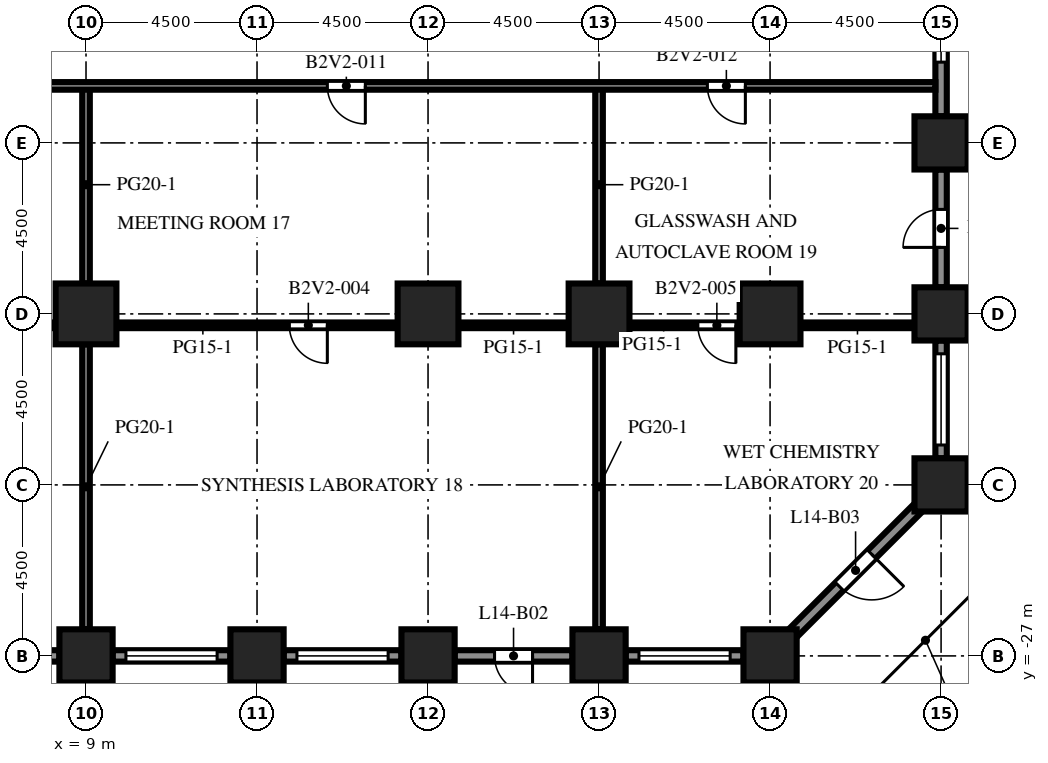
"""IFC4 building model, lengths in metres.
Left out: names, types, materials, properties, quantities, classifications, styles, units other than length and angle.
Written with IfcOpenShell. Run it as: python <this file> out.ifc"""

import sys

from ifc_helpers import new_model, si_unit, direction, frame, frame_2d, origin, origin_2d, place, context, subcontext, project, spatial, rectangle, extrude, element, fill, save


model = new_model("IFC4")
c1 = context("Model", 3, precision=1e-05, world=origin(), true_north=direction((0.0, 1.0)))
c2 = subcontext(c1, "Body", "Model", "MODEL_VIEW")
j1 = project(units=[si_unit("LENGTHUNIT", "METRE"), si_unit("PLANEANGLEUNIT", "RADIAN")], contexts=[c1])
p1 = place(None, origin())
s1 = spatial("IfcSite", under=j1, at=p1, CompositionType="ELEMENT")
p2 = place(p1, origin())
s2 = spatial("IfcBuilding", under=s1, at=p2, CompositionType="ELEMENT")
p3 = place(p2, frame((0.0, 0.0, 62.4)))
s3 = spatial("IfcBuildingStorey", under=s2, at=p3, CompositionType="ELEMENT", Elevation=62.4)
for number, where, z_axis, x_axis in (
    (1, (9.0, -27.0, 0.0), (0.0, 0.0, 1.0), (1.0, 0.0, 0.0)),
    (2, (13.5, -27.0, 0.0), (0.0, 0.0, 1.0), (1.0, 0.0, 0.0)),
    (3, (18.0, -27.0, 0.0), (0.0, 0.0, 1.0), (1.0, 0.0, 0.0)),
    (4, (22.5, -27.0, 0.0), (0.0, 0.0, 1.0), (1.0, 0.0, 0.0)),
    (5, (27.0, -27.0, 0.0), (0.0, 0.0, 1.0), (1.0, 0.0, 0.0)),
    (6, (31.5, -22.5, 0.0), (0.0, 0.0, 1.0), (1.0, 0.0, 0.0)),
    (7, (31.5, -18.0, 0.0), (0.0, 0.0, 1.0), (1.0, 0.0, 0.0)),
    (8, (31.5, -13.5, 0.0), (0.0, 0.0, 1.0), (1.0, 0.0, 0.0)),
):
    element("IfcColumn", number, at=place(p3, frame(where, z_axis=z_axis, x_axis=x_axis)), inside=s3, PredefinedType="COLUMN", context=c2, shape_type="SweptSolid", body=[
        extrude(rectangle(XDim=1.4, YDim=1.4, at=origin_2d()), origin(), (0.0, 0.0, 1.0), 4.1),
    ])
for number, where, z_axis, x_axis in (
    (9, (9.0, -18.0, 0.0), (0.0, 0.0, 1.0), (1.0, 0.0, 0.0)),
    (10, (18.0, -18.0, 0.0), (0.0, 0.0, 1.0), (1.0, 0.0, 0.0)),
    (11, (22.5, -18.0, 0.0), (0.0, 0.0, 1.0), (1.0, 0.0, 0.0)),
    (12, (27.0, -18.0, 0.0), (0.0, 0.0, 1.0), (1.0, 0.0, 0.0)),
):
    element("IfcColumn", number, at=place(p3, frame(where, z_axis=z_axis, x_axis=x_axis)), inside=s3, PredefinedType="COLUMN", context=c2, shape_type="SweptSolid", body=[
        extrude(rectangle(XDim=1.6, YDim=1.6, at=origin_2d()), origin(), (0.0, 0.0, 1.0), 4.1),
    ])
p4 = place(p3, frame((8.3, -27.0, 0.0), z_axis=(0.0, 0.0, 1.0), x_axis=(-1.0, 0.0, 0.0)))
e13 = element("IfcWall", 13, at=p4, inside=s3, PredefinedType="SOLIDWALL", context=c2, shape_type="SweptSolid", body=[
    extrude(rectangle(XDim=3.1, YDim=0.3, at=frame_2d((1.55, 0.0))), origin(), (0.0, 0.0, 1.0), 2.75),
])
p5 = place(p4, frame((0.35, 0.0, 0.8)))
e14 = element("IfcOpeningElement", 14, at=p5, cuts=e13, PredefinedType="OPENING", context=c2, shape_type="SweptSolid", body=[
    extrude(rectangle(XDim=2.4, YDim=1.7, at=frame_2d((1.2, 0.85))), frame((0.0, 0.16, 0.0), z_axis=(0.0, -1.0, 0.0), x_axis=(1.0, 0.0, 0.0)), (0.0, 0.0, 1.0), 0.32),
])
p6 = place(p3, frame((12.8, -27.0, 0.0), z_axis=(0.0, 0.0, 1.0), x_axis=(-1.0, 0.0, 0.0)))
e15 = element("IfcWall", 15, at=p6, inside=s3, PredefinedType="SOLIDWALL", context=c2, shape_type="SweptSolid", body=[
    extrude(rectangle(XDim=3.1, YDim=0.3, at=frame_2d((1.55, 0.0))), origin(), (0.0, 0.0, 1.0), 2.75),
])
p7 = place(p6, frame((0.35, 0.0, 0.8)))
e16 = element("IfcOpeningElement", 16, at=p7, cuts=e15, PredefinedType="OPENING", context=c2, shape_type="SweptSolid", body=[
    extrude(rectangle(XDim=2.4, YDim=1.7, at=frame_2d((1.2, 0.85))), frame((0.0, 0.16, 0.0), z_axis=(0.0, -1.0, 0.0), x_axis=(1.0, 0.0, 0.0)), (0.0, 0.0, 1.0), 0.32),
])
p8 = place(p3, frame((17.3, -27.0, 0.0), z_axis=(0.0, 0.0, 1.0), x_axis=(-1.0, 0.0, 0.0)))
e17 = element("IfcWall", 17, at=p8, inside=s3, PredefinedType="SOLIDWALL", context=c2, shape_type="SweptSolid", body=[
    extrude(rectangle(XDim=3.1, YDim=0.3, at=frame_2d((1.55, 0.0))), origin(), (0.0, 0.0, 1.0), 2.75),
])
p9 = place(p8, frame((0.35, 0.0, 0.8)))
e18 = element("IfcOpeningElement", 18, at=p9, cuts=e17, PredefinedType="OPENING", context=c2, shape_type="SweptSolid", body=[
    extrude(rectangle(XDim=2.4, YDim=1.7, at=frame_2d((1.2, 0.85))), frame((0.0, 0.16, 0.0), z_axis=(0.0, -1.0, 0.0), x_axis=(1.0, 0.0, 0.0)), (0.0, 0.0, 1.0), 0.32),
])
p10 = place(p3, frame((21.8, -27.0, 0.0), z_axis=(0.0, 0.0, 1.0), x_axis=(-1.0, 0.0, 0.0)))
e19 = element("IfcWall", 19, at=p10, inside=s3, PredefinedType="SOLIDWALL", context=c2, shape_type="SweptSolid", body=[
    extrude(rectangle(XDim=3.1, YDim=0.3, at=frame_2d((1.55, 0.0))), origin(), (0.0, 0.0, 1.0), 2.75),
])
p11 = place(p10, frame((1.05, 0.0, 0.0)))
e20 = element("IfcOpeningElement", 20, at=p11, cuts=e19, PredefinedType="OPENING", context=c2, shape_type="SweptSolid", body=[
    extrude(rectangle(XDim=1.0, YDim=2.2, at=frame_2d((0.5, 1.1))), frame((0.0, 0.16, 0.0), z_axis=(0.0, -1.0, 0.0), x_axis=(1.0, 0.0, 0.0)), (0.0, 0.0, 1.0), 0.32),
])
p12 = place(p3, frame((26.3, -27.0, 0.0), z_axis=(0.0, 0.0, 1.0), x_axis=(-1.0, 0.0, 0.0)))
e21 = element("IfcWall", 21, at=p12, inside=s3, PredefinedType="SOLIDWALL", context=c2, shape_type="SweptSolid", body=[
    extrude(rectangle(XDim=3.1, YDim=0.3, at=frame_2d((1.55, 0.0))), origin(), (0.0, 0.0, 1.0), 2.75),
])
p13 = place(p12, frame((0.35, 0.0, 0.8)))
e22 = element("IfcOpeningElement", 22, at=p13, cuts=e21, PredefinedType="OPENING", context=c2, shape_type="SweptSolid", body=[
    extrude(rectangle(XDim=2.4, YDim=1.7, at=frame_2d((1.2, 0.85))), frame((0.0, 0.16, 0.0), z_axis=(0.0, -1.0, 0.0), x_axis=(1.0, 0.0, 0.0)), (0.0, 0.0, 1.0), 0.32),
])
p14 = place(p3, frame((30.906, -23.094, 0.0), z_axis=(0.0, 0.0, 1.0), x_axis=(-0.707106781187, -0.707106781187, 0.0)))
e23 = element("IfcWall", 23, at=p14, inside=s3, PredefinedType="SOLIDWALL", context=c2, shape_type="SweptSolid", body=[
    extrude(rectangle(XDim=4.684, YDim=0.3, at=frame_2d((2.342, 0.0))), origin(), (0.0, 0.0, 1.0), 2.75),
])
p15 = place(p14, frame((1.742, 0.0, 0.0)))
e24 = element("IfcOpeningElement", 24, at=p15, cuts=e23, PredefinedType="OPENING", context=c2, shape_type="SweptSolid", body=[
    extrude(rectangle(XDim=1.2, YDim=2.2, at=frame_2d((0.6, 1.1))), frame((0.0, 0.16, 0.0), z_axis=(0.0, -1.0, 0.0), x_axis=(1.0, 0.0, 0.0)), (0.0, 0.0, 1.0), 0.32),
])
p16 = place(p3, frame((31.5, -18.7, 0.0), z_axis=(0.0, 0.0, 1.0), x_axis=(0.0, -1.0, 0.0)))
e25 = element("IfcWall", 25, at=p16, inside=s3, PredefinedType="SOLIDWALL", context=c2, shape_type="SweptSolid", body=[
    extrude(rectangle(XDim=3.1, YDim=0.3, at=frame_2d((1.55, 0.0))), origin(), (0.0, 0.0, 1.0), 2.75),
])
p17 = place(p16, frame((0.35, 0.0, 0.8)))
e26 = element("IfcOpeningElement", 26, at=p17, cuts=e25, PredefinedType="OPENING", context=c2, shape_type="SweptSolid", body=[
    extrude(rectangle(XDim=2.4, YDim=1.7, at=frame_2d((1.2, 0.85))), frame((0.0, 0.16, 0.0), z_axis=(0.0, -1.0, 0.0), x_axis=(1.0, 0.0, 0.0)), (0.0, 0.0, 1.0), 0.32),
])
p18 = place(p3, frame((31.5, -14.2, 0.0), z_axis=(0.0, 0.0, 1.0), x_axis=(0.0, -1.0, 0.0)))
e27 = element("IfcWall", 27, at=p18, inside=s3, PredefinedType="SOLIDWALL", context=c2, shape_type="SweptSolid", body=[
    extrude(rectangle(XDim=3.1, YDim=0.3, at=frame_2d((1.55, 0.0))), origin(), (0.0, 0.0, 1.0), 2.75),
])
p19 = place(p18, frame((1.05, 0.0, 0.0)))
e28 = element("IfcOpeningElement", 28, at=p19, cuts=e27, PredefinedType="OPENING", context=c2, shape_type="SweptSolid", body=[
    extrude(rectangle(XDim=1.0, YDim=2.2, at=frame_2d((0.5, 1.1))), frame((0.0, 0.16, 0.0), z_axis=(0.0, -1.0, 0.0), x_axis=(1.0, 0.0, 0.0)), (0.0, 0.0, 1.0), 0.32),
])
p20 = place(p3, frame((31.5, -9.7, 0.0), z_axis=(0.0, 0.0, 1.0), x_axis=(0.0, -1.0, 0.0)))
e29 = element("IfcWall", 29, at=p20, inside=s3, PredefinedType="SOLIDWALL", context=c2, shape_type="SweptSolid", body=[
    extrude(rectangle(XDim=3.1, YDim=0.3, at=frame_2d((1.55, 0.0))), origin(), (0.0, 0.0, 1.0), 2.75),
])
p21 = place(p20, frame((0.475, 0.0, 0.8)))
e30 = element("IfcOpeningElement", 30, at=p21, cuts=e29, PredefinedType="OPENING", context=c2, shape_type="SweptSolid", body=[
    extrude(rectangle(XDim=1.2, YDim=1.7, at=frame_2d((0.6, 0.85))), frame((0.0, 0.16, 0.0), z_axis=(0.0, -1.0, 0.0), x_axis=(1.0, 0.0, 0.0)), (0.0, 0.0, 1.0), 0.32),
])
p22 = place(p3, frame((9.0, -26.3, 0.0), z_axis=(0.0, 0.0, 1.0), x_axis=(0.0, 1.0, 0.0)))
e31 = element("IfcWall", 31, at=p22, inside=s3, PredefinedType="PARTITIONING", context=c2, shape_type="SweptSolid", body=[
    extrude(rectangle(XDim=7.5, YDim=0.2, at=frame_2d((3.75, 0.0))), origin(), (0.0, 0.0, 1.0), 3.65),
])
p23 = place(p3, frame((9.0, -17.2, 0.0), z_axis=(0.0, 0.0, 1.0), x_axis=(0.0, 1.0, 0.0)))
e32 = element("IfcWall", 32, at=p23, inside=s3, PredefinedType="PARTITIONING", context=c2, shape_type="SweptSolid", body=[
    extrude(rectangle(XDim=5.2, YDim=0.2, at=frame_2d((2.6, 0.0))), origin(), (0.0, 0.0, 1.0), 3.65),
])
p24 = place(p3, frame((22.5, -26.3, 0.0), z_axis=(0.0, 0.0, 1.0), x_axis=(0.0, 1.0, 0.0)))
e33 = element("IfcWall", 33, at=p24, inside=s3, PredefinedType="PARTITIONING", context=c2, shape_type="SweptSolid", body=[
    extrude(rectangle(XDim=7.5, YDim=0.2, at=frame_2d((3.75, 0.0))), origin(), (0.0, 0.0, 1.0), 3.65),
])
p25 = place(p3, frame((22.5, -17.2, 0.0), z_axis=(0.0, 0.0, 1.0), x_axis=(0.0, 1.0, 0.0)))
e34 = element("IfcWall", 34, at=p25, inside=s3, PredefinedType="PARTITIONING", context=c2, shape_type="SweptSolid", body=[
    extrude(rectangle(XDim=5.2, YDim=0.2, at=frame_2d((2.6, 0.0))), origin(), (0.0, 0.0, 1.0), 3.65),
])
p26 = place(p3, frame((8.2, -18.3, 0.0), z_axis=(0.0, 0.0, 1.0), x_axis=(-1.0, 0.0, 0.0)))
e35 = element("IfcWall", 35, at=p26, inside=s3, PredefinedType="PARTITIONING", context=c2, shape_type="SweptSolid", body=[
    extrude(rectangle(XDim=7.4, YDim=0.15, at=frame_2d((3.7, 0.0))), origin(), (0.0, 0.0, 1.0), 3.65),
])
p27 = place(p26, frame((2.1, 0.0, 0.0)))
e36 = element("IfcOpeningElement", 36, at=p27, cuts=e35, PredefinedType="OPENING", context=c2, shape_type="SweptSolid", body=[
    extrude(rectangle(XDim=1.0, YDim=2.1, at=frame_2d((0.5, 1.05))), frame((0.0, 0.085, 0.0), z_axis=(0.0, -1.0, 0.0), x_axis=(1.0, 0.0, 0.0)), (0.0, 0.0, 1.0), 0.17),
])
p28 = place(p3, frame((17.2, -18.3, 0.0), z_axis=(0.0, 0.0, 1.0), x_axis=(-1.0, 0.0, 0.0)))
e37 = element("IfcWall", 37, at=p28, inside=s3, PredefinedType="PARTITIONING", context=c2, shape_type="SweptSolid", body=[
    extrude(rectangle(XDim=7.4, YDim=0.15, at=frame_2d((3.7, 0.0))), origin(), (0.0, 0.0, 1.0), 3.65),
])
p29 = place(p28, frame((1.85, 0.0, 0.0)))
e38 = element("IfcOpeningElement", 38, at=p29, cuts=e37, PredefinedType="OPENING", context=c2, shape_type="SweptSolid", body=[
    extrude(rectangle(XDim=1.0, YDim=2.1, at=frame_2d((0.5, 1.05))), frame((0.0, 0.085, 0.0), z_axis=(0.0, -1.0, 0.0), x_axis=(1.0, 0.0, 0.0)), (0.0, 0.0, 1.0), 0.17),
])
p30 = place(p3, frame((18.8, -18.3, 0.0), z_axis=(0.0, 0.0, 1.0), x_axis=(1.0, 0.0, 0.0)))
e39 = element("IfcWall", 39, at=p30, inside=s3, PredefinedType="PARTITIONING", context=c2, shape_type="SweptSolid", body=[
    extrude(rectangle(XDim=2.9, YDim=0.15, at=frame_2d((1.45, 0.0))), origin(), (0.0, 0.0, 1.0), 3.65),
])
p31 = place(p3, frame((26.2, -18.3, 0.0), z_axis=(0.0, 0.0, 1.0), x_axis=(-1.0, 0.0, 0.0)))
e40 = element("IfcWall", 40, at=p31, inside=s3, PredefinedType="PARTITIONING", context=c2, shape_type="SweptSolid", body=[
    extrude(rectangle(XDim=2.9, YDim=0.15, at=frame_2d((1.45, 0.0))), origin(), (0.0, 0.0, 1.0), 3.65),
])
p32 = place(p31, frame((0.1, 0.0, 0.0)))
e41 = element("IfcOpeningElement", 41, at=p32, cuts=e40, PredefinedType="OPENING", context=c2, shape_type="SweptSolid", body=[
    extrude(rectangle(XDim=1.0, YDim=2.1, at=frame_2d((0.5, 1.05))), frame((0.0, 0.085, 0.0), z_axis=(0.0, -1.0, 0.0), x_axis=(1.0, 0.0, 0.0)), (0.0, 0.0, 1.0), 0.17),
])
p33 = place(p3, frame((27.8, -18.3, 0.0), z_axis=(0.0, 0.0, 1.0), x_axis=(1.0, 0.0, 0.0)))
e42 = element("IfcWall", 42, at=p33, inside=s3, PredefinedType="PARTITIONING", context=c2, shape_type="SweptSolid", body=[
    extrude(rectangle(XDim=3.0, YDim=0.15, at=frame_2d((1.5, 0.0))), origin(), (0.0, 0.0, 1.0), 3.65),
])
p34 = place(p3, frame((31.35, -12.0, 0.0), z_axis=(0.0, 0.0, 1.0), x_axis=(-1.0, 0.0, 0.0)))
e43 = element("IfcWall", 43, at=p34, inside=s3, PredefinedType="PARTITIONING", context=c2, shape_type="SweptSolid", body=[
    extrude(rectangle(XDim=53.7, YDim=0.2, at=frame_2d((26.85, 0.0))), origin(), (0.0, 0.0, 1.0), 3.65),
])
p35 = place(p34, frame((45.25, 0.0, 0.0)))
e44 = element("IfcOpeningElement", 44, at=p35, cuts=e43, PredefinedType="OPENING", context=c2, shape_type="SweptSolid", body=[
    extrude(rectangle(XDim=1.0, YDim=2.1, at=frame_2d((0.5, 1.05))), frame((0.0, 0.11, 0.0), z_axis=(0.0, -1.0, 0.0), x_axis=(1.0, 0.0, 0.0)), (0.0, 0.0, 1.0), 0.22),
])
p36 = place(p34, frame((34.25, 0.0, 0.0)))
e45 = element("IfcOpeningElement", 45, at=p36, cuts=e43, PredefinedType="OPENING", context=c2, shape_type="SweptSolid", body=[
    extrude(rectangle(XDim=1.0, YDim=2.1, at=frame_2d((0.5, 1.05))), frame((0.0, 0.11, 0.0), z_axis=(0.0, -1.0, 0.0), x_axis=(1.0, 0.0, 0.0)), (0.0, 0.0, 1.0), 0.22),
])
p37 = place(p34, frame((25.5, 0.0, 0.0)))
e46 = element("IfcOpeningElement", 46, at=p37, cuts=e43, PredefinedType="OPENING", context=c2, shape_type="SweptSolid", body=[
    extrude(rectangle(XDim=1.0, YDim=2.1, at=frame_2d((0.5, 1.05))), frame((0.0, 0.11, 0.0), z_axis=(0.0, -1.0, 0.0), x_axis=(1.0, 0.0, 0.0)), (0.0, 0.0, 1.0), 0.22),
])
p38 = place(p34, frame((15.0, 0.0, 0.0)))
e47 = element("IfcOpeningElement", 47, at=p38, cuts=e43, PredefinedType="OPENING", context=c2, shape_type="SweptSolid", body=[
    extrude(rectangle(XDim=1.0, YDim=2.1, at=frame_2d((0.5, 1.05))), frame((0.0, 0.11, 0.0), z_axis=(0.0, -1.0, 0.0), x_axis=(1.0, 0.0, 0.0)), (0.0, 0.0, 1.0), 0.22),
])
p39 = place(p34, frame((5.0, 0.0, 0.0)))
e48 = element("IfcOpeningElement", 48, at=p39, cuts=e43, PredefinedType="OPENING", context=c2, shape_type="SweptSolid", body=[
    extrude(rectangle(XDim=1.0, YDim=2.1, at=frame_2d((0.5, 1.05))), frame((0.0, 0.11, 0.0), z_axis=(0.0, -1.0, 0.0), x_axis=(1.0, 0.0, 0.0)), (0.0, 0.0, 1.0), 0.22),
])
p40 = place(p7, origin())
e49 = element("IfcWindow", 49, at=p40, inside=s3, PartitioningType="SINGLE_PANEL", PredefinedType="WINDOW", context=c2, shape_type="SweptSolid", body=[
    extrude(rectangle(XDim=2.4, YDim=1.7, at=frame_2d((1.2, 0.85))), frame((0.0, 0.03, 0.0), z_axis=(0.0, -1.0, 0.0), x_axis=(1.0, 0.0, 0.0)), (0.0, 0.0, 1.0), 0.06),
])
fill(e16, e49)
p41 = place(p9, origin())
e50 = element("IfcWindow", 50, at=p41, inside=s3, PartitioningType="SINGLE_PANEL", PredefinedType="WINDOW", context=c2, shape_type="SweptSolid", body=[
    extrude(rectangle(XDim=2.4, YDim=1.7, at=frame_2d((1.2, 0.85))), frame((0.0, 0.03, 0.0), z_axis=(0.0, -1.0, 0.0), x_axis=(1.0, 0.0, 0.0)), (0.0, 0.0, 1.0), 0.06),
])
fill(e18, e50)
p42 = place(p11, origin())
e51 = element("IfcDoor", 51, at=p42, inside=s3, OperationType="SINGLE_SWING_LEFT", PredefinedType="DOOR", context=c2, shape_type="SweptSolid", body=[
    extrude(rectangle(XDim=1.0, YDim=2.2, at=frame_2d((0.5, 1.1))), frame((0.0, 0.025, 0.0), z_axis=(0.0, -1.0, 0.0), x_axis=(1.0, 0.0, 0.0)), (0.0, 0.0, 1.0), 0.05),
])
fill(e20, e51)
p43 = place(p13, origin())
e52 = element("IfcWindow", 52, at=p43, inside=s3, PartitioningType="SINGLE_PANEL", PredefinedType="WINDOW", context=c2, shape_type="SweptSolid", body=[
    extrude(rectangle(XDim=2.4, YDim=1.7, at=frame_2d((1.2, 0.85))), frame((0.0, 0.03, 0.0), z_axis=(0.0, -1.0, 0.0), x_axis=(1.0, 0.0, 0.0)), (0.0, 0.0, 1.0), 0.06),
])
fill(e22, e52)
p44 = place(p15, origin())
e53 = element("IfcDoor", 53, at=p44, inside=s3, OperationType="SINGLE_SWING_LEFT", PredefinedType="DOOR", context=c2, shape_type="SweptSolid", body=[
    extrude(rectangle(XDim=1.2, YDim=2.2, at=frame_2d((0.6, 1.1))), frame((0.0, 0.025, 0.0), z_axis=(0.0, -1.0, 0.0), x_axis=(1.0, 0.0, 0.0)), (0.0, 0.0, 1.0), 0.05),
])
fill(e24, e53)
p45 = place(p17, origin())
e54 = element("IfcWindow", 54, at=p45, inside=s3, PartitioningType="SINGLE_PANEL", PredefinedType="WINDOW", context=c2, shape_type="SweptSolid", body=[
    extrude(rectangle(XDim=2.4, YDim=1.7, at=frame_2d((1.2, 0.85))), frame((0.0, 0.03, 0.0), z_axis=(0.0, -1.0, 0.0), x_axis=(1.0, 0.0, 0.0)), (0.0, 0.0, 1.0), 0.06),
])
fill(e26, e54)
p46 = place(p19, origin())
e55 = element("IfcDoor", 55, at=p46, inside=s3, OperationType="SINGLE_SWING_RIGHT", PredefinedType="DOOR", context=c2, shape_type="SweptSolid", body=[
    extrude(rectangle(XDim=1.0, YDim=2.2, at=frame_2d((0.5, 1.1))), frame((0.0, 0.025, 0.0), z_axis=(0.0, -1.0, 0.0), x_axis=(1.0, 0.0, 0.0)), (0.0, 0.0, 1.0), 0.05),
])
fill(e28, e55)
p47 = place(p21, origin())
e56 = element("IfcWindow", 56, at=p47, inside=s3, PartitioningType="SINGLE_PANEL", PredefinedType="WINDOW", context=c2, shape_type="SweptSolid", body=[
    extrude(rectangle(XDim=1.2, YDim=1.7, at=frame_2d((0.6, 0.85))), frame((0.0, 0.03, 0.0), z_axis=(0.0, -1.0, 0.0), x_axis=(1.0, 0.0, 0.0)), (0.0, 0.0, 1.0), 0.06),
])
fill(e30, e56)
p48 = place(p29, origin())
e57 = element("IfcDoor", 57, at=p48, inside=s3, OperationType="SINGLE_SWING_LEFT", PredefinedType="DOOR", context=c2, shape_type="SweptSolid", body=[
    extrude(rectangle(XDim=1.0, YDim=2.1, at=frame_2d((0.5, 1.05))), frame((0.0, 0.025, 0.0), z_axis=(0.0, -1.0, 0.0), x_axis=(1.0, 0.0, 0.0)), (0.0, 0.0, 1.0), 0.05),
])
fill(e38, e57)
p49 = place(p32, origin())
e58 = element("IfcDoor", 58, at=p49, inside=s3, OperationType="SINGLE_SWING_LEFT", PredefinedType="DOOR", context=c2, shape_type="SweptSolid", body=[
    extrude(rectangle(XDim=1.0, YDim=2.1, at=frame_2d((0.5, 1.05))), frame((0.0, 0.025, 0.0), z_axis=(0.0, -1.0, 0.0), x_axis=(1.0, 0.0, 0.0)), (0.0, 0.0, 1.0), 0.05),
])
fill(e41, e58)
p50 = place(p38, origin())
e59 = element("IfcDoor", 59, at=p50, inside=s3, OperationType="SINGLE_SWING_LEFT", PredefinedType="DOOR", context=c2, shape_type="SweptSolid", body=[
    extrude(rectangle(XDim=1.0, YDim=2.1, at=frame_2d((0.5, 1.05))), frame((0.0, 0.025, 0.0), z_axis=(0.0, -1.0, 0.0), x_axis=(1.0, 0.0, 0.0)), (0.0, 0.0, 1.0), 0.05),
])
fill(e47, e59)
p51 = place(p39, origin())
e60 = element("IfcDoor", 60, at=p51, inside=s3, OperationType="SINGLE_SWING_LEFT", PredefinedType="DOOR", context=c2, shape_type="SweptSolid", body=[
    extrude(rectangle(XDim=1.0, YDim=2.1, at=frame_2d((0.5, 1.05))), frame((0.0, 0.025, 0.0), z_axis=(0.0, -1.0, 0.0), x_axis=(1.0, 0.0, 0.0)), (0.0, 0.0, 1.0), 0.05),
])
fill(e48, e60)
save(model, sys.argv[1])
